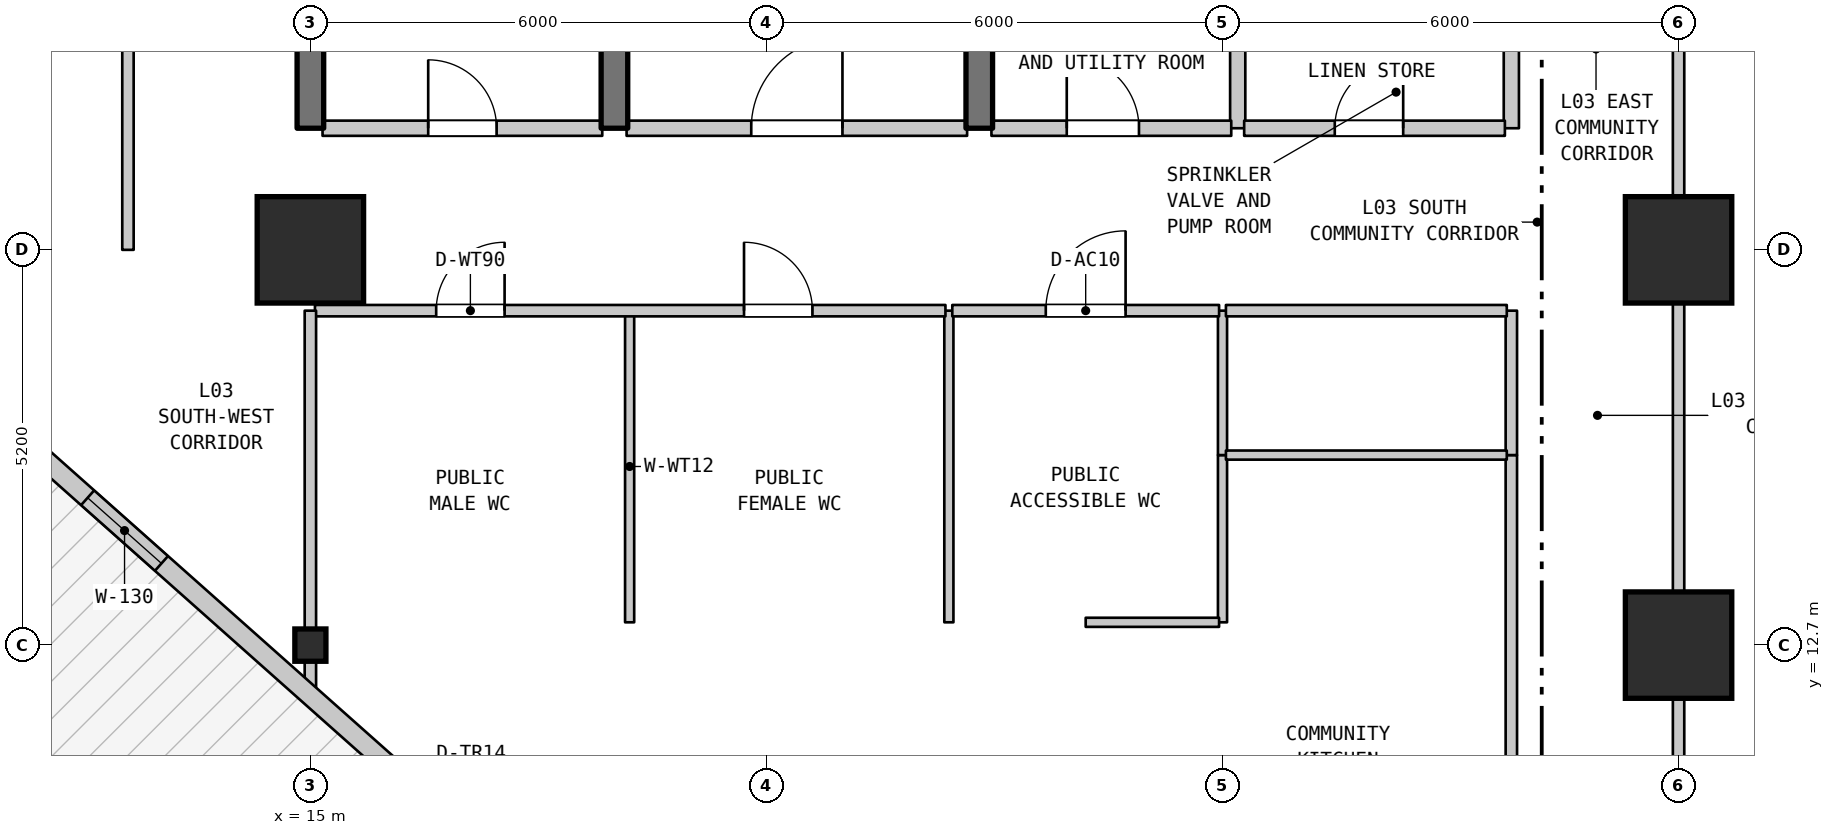
"""IFC4 building model, lengths in metres.
Left out: names, types, materials, properties, quantities, classifications, styles, units other than length and angle.
Written with IfcOpenShell. Run it as: python <this file> out.ifc"""

import sys

from ifc_helpers import new_model, si_unit, direction, frame, frame_2d, origin, origin_2d, place, context, subcontext, project, spatial, rectangle, i_section, extrude, element, fill, save


model = new_model("IFC4")
c1 = context("Model", 3, precision=1e-05, world=origin(), true_north=direction((0.0, 1.0)))
c2 = subcontext(c1, "Body", "Model", "MODEL_VIEW")
j1 = project(units=[si_unit("LENGTHUNIT", "METRE"), si_unit("PLANEANGLEUNIT", "RADIAN")], contexts=[c1])
p1 = place(None, origin())
s1 = spatial("IfcSite", under=j1, at=p1, CompositionType="ELEMENT")
p2 = place(p1, origin())
s2 = spatial("IfcBuilding", under=s1, at=p2, CompositionType="ELEMENT")
p3 = place(p2, frame((0.0, 0.0, 19.0)))
s3 = spatial("IfcBuildingStorey", under=s2, at=p3, CompositionType="ELEMENT", Elevation=19.0)
p4 = place(p3, frame((15.0, 12.7, 0.0), z_axis=(0.0, 0.0, 1.0), x_axis=(1.0, 0.0, 0.0)))
e1 = element("IfcColumn", 1, at=p4, inside=s3, PredefinedType="COLUMN", context=c2, shape_type="SweptSolid", body=[
    extrude(i_section(OverallWidth=0.409, OverallDepth=0.425, WebThickness=0.032, FlangeThickness=0.052, FilletRadius=0.015, at=origin_2d()), origin(), (0.0, 0.0, 1.0), 5.0),
])
for number, where, z_axis, x_axis in (
    (2, (15.0, 17.9, 0.0), (0.0, 0.0, 1.0), (1.0, 0.0, 0.0)),
    (3, (33.0, 12.7, 0.0), (0.0, 0.0, 1.0), (1.0, 0.0, 0.0)),
    (4, (33.0, 17.9, 0.0), (0.0, 0.0, 1.0), (1.0, 0.0, 0.0)),
):
    element("IfcColumn", number, at=place(p3, frame(where, z_axis=z_axis, x_axis=x_axis)), inside=s3, PredefinedType="COLUMN", context=c2, shape_type="SweptSolid", body=[
        extrude(rectangle(XDim=1.4, YDim=1.4, at=origin_2d()), origin(), (0.0, 0.0, 1.0), 5.0),
    ])
p5 = place(p3, frame((12.6, 17.9, 0.0), z_axis=(0.0, 0.0, 1.0), x_axis=(0.0, 1.0, 0.0)))
e5 = element("IfcWall", 5, at=p5, inside=s3, PredefinedType="STANDARD", context=c2, shape_type="SweptSolid", body=[
    extrude(rectangle(XDim=20.0, YDim=0.15, at=frame_2d((10.0, 0.0))), origin(), (0.0, 0.0, 1.0), 4.685),
])
p6 = place(p5, frame((8.93, 0.0, 0.0)))
e6 = element("IfcOpeningElement", 6, at=p6, cuts=e5, PredefinedType="OPENING", context=c2, shape_type="SweptSolid", body=[
    extrude(rectangle(XDim=1.2, YDim=2.2, at=frame_2d((0.6, 1.1))), frame((0.0, 0.085, 0.0), z_axis=(0.0, -1.0, 0.0), x_axis=(1.0, 0.0, 0.0)), (0.0, 0.0, 1.0), 0.17),
])
p7 = place(p3, frame((15.0, 12.043, 0.0), z_axis=(0.0, 0.0, 1.0), x_axis=(0.0, 1.0, 0.0)))
e7 = element("IfcWall", 7, at=p7, inside=s3, PredefinedType="STANDARD", context=c2, shape_type="SweptSolid", body=[
    extrude(rectangle(XDim=0.657, YDim=0.15, at=frame_2d((0.329, 0.0))), origin(), (0.0, 0.0, 1.0), 4.685),
])
for number, where, z_axis, x_axis in (
    (8, (15.0, 19.5, 0.0), (0.0, 0.0, 1.0), (0.0, 1.0, 0.0)),
    (9, (19.0, 19.5, 0.0), (0.0, 0.0, 1.0), (0.0, 1.0, 0.0)),
):
    element("IfcWall", number, at=place(p3, frame(where, z_axis=z_axis, x_axis=x_axis)), inside=s3, PredefinedType="SHEAR", context=c2, shape_type="SweptSolid", body=[
        extrude(rectangle(XDim=3.2, YDim=0.35, at=frame_2d((1.6, 0.0))), origin(), (0.0, 0.0, 1.0), 4.685),
    ])
for number, where, z_axis, x_axis in (
    (10, (19.2, 13.0, 0.0), (0.0, 0.0, 1.0), (0.0, 1.0, 0.0)),
    (11, (23.4, 13.0, 0.0), (0.0, 0.0, 1.0), (0.0, 1.0, 0.0)),
):
    element("IfcWall", number, at=place(p3, frame(where, z_axis=z_axis, x_axis=x_axis)), inside=s3, PredefinedType="PARTITIONING", context=c2, shape_type="SweptSolid", body=[
        extrude(rectangle(XDim=4.1, YDim=0.12, at=frame_2d((2.05, 0.0))), origin(), (0.0, 0.0, 1.0), 4.685),
    ])
p8 = place(p3, frame((23.8, 19.5, 0.0), z_axis=(0.0, 0.0, 1.0), x_axis=(0.0, 1.0, 0.0)))
e12 = element("IfcWall", 12, at=p8, inside=s3, PredefinedType="SHEAR", context=c2, shape_type="SweptSolid", body=[
    extrude(rectangle(XDim=3.2, YDim=0.35, at=frame_2d((1.6, 0.0))), origin(), (0.0, 0.0, 1.0), 4.685),
])
p9 = place(p3, frame((27.0, 13.0, 0.0), z_axis=(0.0, 0.0, 1.0), x_axis=(0.0, 1.0, 0.0)))
e13 = element("IfcWall", 13, at=p9, inside=s3, PredefinedType="PARTITIONING", context=c2, shape_type="SweptSolid", body=[
    extrude(rectangle(XDim=2.2, YDim=0.12, at=frame_2d((1.1, 0.0))), origin(), (0.0, 0.0, 1.0), 4.685),
])
p10 = place(p3, frame((27.0, 15.2, 0.0), z_axis=(0.0, 0.0, 1.0), x_axis=(0.0, 1.0, 0.0)))
e14 = element("IfcWall", 14, at=p10, inside=s3, PredefinedType="PARTITIONING", context=c2, shape_type="SweptSolid", body=[
    extrude(rectangle(XDim=1.9, YDim=0.12, at=frame_2d((0.95, 0.0))), origin(), (0.0, 0.0, 1.0), 4.685),
])
p11 = place(p3, frame((27.2, 19.5, 0.0), z_axis=(0.0, 0.0, 1.0), x_axis=(0.0, 1.0, 0.0)))
e15 = element("IfcWall", 15, at=p11, inside=s3, PredefinedType="STANDARD", context=c2, shape_type="SweptSolid", body=[
    extrude(rectangle(XDim=1.6, YDim=0.2, at=frame_2d((0.8, 0.0))), origin(), (0.0, 0.0, 1.0), 4.685),
])
p12 = place(p3, frame((30.8, 8.5, 0.0), z_axis=(0.0, 0.0, 1.0), x_axis=(0.0, 1.0, 0.0)))
e16 = element("IfcWall", 16, at=p12, inside=s3, PredefinedType="STANDARD", context=c2, shape_type="SweptSolid", body=[
    extrude(rectangle(XDim=6.7, YDim=0.15, at=frame_2d((3.35, 0.0))), origin(), (0.0, 0.0, 1.0), 4.685),
])
p13 = place(p3, frame((30.8, 15.2, 0.0), z_axis=(0.0, 0.0, 1.0), x_axis=(0.0, 1.0, 0.0)))
e17 = element("IfcWall", 17, at=p13, inside=s3, PredefinedType="STANDARD", context=c2, shape_type="SweptSolid", body=[
    extrude(rectangle(XDim=1.9, YDim=0.15, at=frame_2d((0.95, 0.0))), origin(), (0.0, 0.0, 1.0), 4.685),
])
p14 = place(p3, frame((30.8, 19.5, 0.0), z_axis=(0.0, 0.0, 1.0), x_axis=(0.0, 1.0, 0.0)))
e18 = element("IfcWall", 18, at=p14, inside=s3, PredefinedType="STANDARD", context=c2, shape_type="SweptSolid", body=[
    extrude(rectangle(XDim=1.6, YDim=0.2, at=frame_2d((0.8, 0.0))), origin(), (0.0, 0.0, 1.0), 4.685),
])
p15 = place(p3, frame((33.0, 6.7, 0.0), z_axis=(0.0, 0.0, 1.0), x_axis=(0.0, 1.0, 0.0)))
e19 = element("IfcWall", 19, at=p15, inside=s3, PredefinedType="STANDARD", context=c2, shape_type="SweptSolid", body=[
    extrude(rectangle(XDim=19.2, YDim=0.15, at=frame_2d((9.6, 0.0))), origin(), (0.0, 0.0, 1.0), 4.185),
])
p16 = place(p3, frame((25.2, 13.0, 0.0), z_axis=(0.0, 0.0, 1.0), x_axis=(1.0, 0.0, 0.0)))
e20 = element("IfcWall", 20, at=p16, inside=s3, PredefinedType="PARTITIONING", context=c2, shape_type="SweptSolid", body=[
    extrude(rectangle(XDim=1.755, YDim=0.12, at=frame_2d((0.877, 0.0))), origin(), (0.0, 0.0, 1.0), 4.685),
])
p17 = place(p3, frame((27.045, 15.2, 0.0), z_axis=(0.0, 0.0, 1.0), x_axis=(1.0, 0.0, 0.0)))
e21 = element("IfcWall", 21, at=p17, inside=s3, PredefinedType="PARTITIONING", context=c2, shape_type="SweptSolid", body=[
    extrude(rectangle(XDim=3.695, YDim=0.12, at=frame_2d((1.848, 0.0))), origin(), (0.0, 0.0, 1.0), 4.685),
])
p18 = place(p3, frame((15.06, 17.1, 0.0), z_axis=(0.0, 0.0, 1.0), x_axis=(1.0, 0.0, 0.0)))
e22 = element("IfcWall", 22, at=p18, inside=s3, PredefinedType="STANDARD", context=c2, shape_type="SweptSolid", body=[
    extrude(rectangle(XDim=8.295, YDim=0.15, at=frame_2d((4.147, 0.0))), origin(), (0.0, 0.0, 1.0), 4.685),
])
p19 = place(p18, frame((1.595, 0.0, 0.0)))
e23 = element("IfcOpeningElement", 23, at=p19, cuts=e22, PredefinedType="OPENING", context=c2, shape_type="SweptSolid", body=[
    extrude(rectangle(XDim=0.9, YDim=2.1, at=frame_2d((0.45, 1.05))), frame((0.0, 0.085, 0.0), z_axis=(0.0, -1.0, 0.0), x_axis=(1.0, 0.0, 0.0)), (0.0, 0.0, 1.0), 0.17),
])
p20 = place(p18, frame((5.645, 0.0, 0.0)))
e24 = element("IfcOpeningElement", 24, at=p20, cuts=e22, PredefinedType="OPENING", context=c2, shape_type="SweptSolid", body=[
    extrude(rectangle(XDim=0.9, YDim=2.1, at=frame_2d((0.45, 1.05))), frame((0.0, 0.085, 0.0), z_axis=(0.0, -1.0, 0.0), x_axis=(1.0, 0.0, 0.0)), (0.0, 0.0, 1.0), 0.17),
])
p21 = place(p3, frame((23.445, 17.1, 0.0), z_axis=(0.0, 0.0, 1.0), x_axis=(1.0, 0.0, 0.0)))
e25 = element("IfcWall", 25, at=p21, inside=s3, PredefinedType="STANDARD", context=c2, shape_type="SweptSolid", body=[
    extrude(rectangle(XDim=3.51, YDim=0.15, at=frame_2d((1.755, 0.0))), origin(), (0.0, 0.0, 1.0), 4.685),
])
p22 = place(p21, frame((1.23, 0.0, 0.0)))
e26 = element("IfcOpeningElement", 26, at=p22, cuts=e25, PredefinedType="OPENING", context=c2, shape_type="SweptSolid", body=[
    extrude(rectangle(XDim=1.05, YDim=2.15, at=frame_2d((0.525, 1.075))), frame((0.0, 0.085, 0.0), z_axis=(0.0, -1.0, 0.0), x_axis=(1.0, 0.0, 0.0)), (0.0, 0.0, 1.0), 0.17),
])
p23 = place(p3, frame((27.045, 17.1, 0.0), z_axis=(0.0, 0.0, 1.0), x_axis=(1.0, 0.0, 0.0)))
e27 = element("IfcWall", 27, at=p23, inside=s3, PredefinedType="STANDARD", context=c2, shape_type="SweptSolid", body=[
    extrude(rectangle(XDim=3.695, YDim=0.15, at=frame_2d((1.848, 0.0))), origin(), (0.0, 0.0, 1.0), 4.685),
])
p24 = place(p3, frame((15.16, 19.5, 0.0), z_axis=(0.0, 0.0, 1.0), x_axis=(1.0, 0.0, 0.0)))
e28 = element("IfcWall", 28, at=p24, inside=s3, PredefinedType="STANDARD", context=c2, shape_type="SweptSolid", body=[
    extrude(rectangle(XDim=3.68, YDim=0.2, at=frame_2d((1.84, 0.0))), origin(), (0.0, 0.0, 1.0), 4.685),
])
p25 = place(p24, frame((1.39, 0.0, 0.0)))
e29 = element("IfcOpeningElement", 29, at=p25, cuts=e28, PredefinedType="OPENING", context=c2, shape_type="SweptSolid", body=[
    extrude(rectangle(XDim=0.9, YDim=2.15, at=frame_2d((0.45, 1.075))), frame((0.0, 0.11, 0.0), z_axis=(0.0, -1.0, 0.0), x_axis=(1.0, 0.0, 0.0)), (0.0, 0.0, 1.0), 0.22),
])
p26 = place(p3, frame((19.16, 19.5, 0.0), z_axis=(0.0, 0.0, 1.0), x_axis=(1.0, 0.0, 0.0)))
e30 = element("IfcWall", 30, at=p26, inside=s3, PredefinedType="STANDARD", context=c2, shape_type="SweptSolid", body=[
    extrude(rectangle(XDim=4.48, YDim=0.2, at=frame_2d((2.24, 0.0))), origin(), (0.0, 0.0, 1.0), 4.685),
])
p27 = place(p26, frame((1.64, 0.0, 0.0)))
e31 = element("IfcOpeningElement", 31, at=p27, cuts=e30, PredefinedType="OPENING", context=c2, shape_type="SweptSolid", body=[
    extrude(rectangle(XDim=1.2, YDim=2.2, at=frame_2d((0.6, 1.1))), frame((0.0, 0.11, 0.0), z_axis=(0.0, -1.0, 0.0), x_axis=(1.0, 0.0, 0.0)), (0.0, 0.0, 1.0), 0.22),
])
p28 = place(p3, frame((23.96, 19.5, 0.0), z_axis=(0.0, 0.0, 1.0), x_axis=(1.0, 0.0, 0.0)))
e32 = element("IfcWall", 32, at=p28, inside=s3, PredefinedType="STANDARD", context=c2, shape_type="SweptSolid", body=[
    extrude(rectangle(XDim=3.155, YDim=0.2, at=frame_2d((1.578, 0.0))), origin(), (0.0, 0.0, 1.0), 4.685),
])
p29 = place(p28, frame((0.991, 0.0, 0.0)))
e33 = element("IfcOpeningElement", 33, at=p29, cuts=e32, PredefinedType="OPENING", context=c2, shape_type="SweptSolid", body=[
    extrude(rectangle(XDim=0.95, YDim=2.15, at=frame_2d((0.475, 1.075))), frame((0.0, 0.11, 0.0), z_axis=(0.0, -1.0, 0.0), x_axis=(1.0, 0.0, 0.0)), (0.0, 0.0, 1.0), 0.22),
])
p30 = place(p3, frame((27.285, 19.5, 0.0), z_axis=(0.0, 0.0, 1.0), x_axis=(1.0, 0.0, 0.0)))
e34 = element("IfcWall", 34, at=p30, inside=s3, PredefinedType="STANDARD", context=c2, shape_type="SweptSolid", body=[
    extrude(rectangle(XDim=3.43, YDim=0.2, at=frame_2d((1.715, 0.0))), origin(), (0.0, 0.0, 1.0), 4.685),
])
p31 = place(p30, frame((1.192, 0.0, 0.0)))
e35 = element("IfcOpeningElement", 35, at=p31, cuts=e34, PredefinedType="OPENING", context=c2, shape_type="SweptSolid", body=[
    extrude(rectangle(XDim=0.9, YDim=2.15, at=frame_2d((0.45, 1.075))), frame((0.0, 0.11, 0.0), z_axis=(0.0, -1.0, 0.0), x_axis=(1.0, 0.0, 0.0)), (0.0, 0.0, 1.0), 0.22),
])
p32 = place(p3, frame((17.64, 9.686, 0.0), z_axis=(0.0, 0.0, 1.0), x_axis=(-0.747409318684, 0.66436383883, 0.0)))
e36 = element("IfcWall", 36, at=p32, inside=s3, PredefinedType="STANDARD", context=c2, shape_type="SweptSolid", body=[
    extrude(rectangle(XDim=18.204, YDim=0.26, at=frame_2d((9.102, 0.0))), origin(), (0.0, 0.0, 1.0), 4.685),
])
p33 = place(p32, origin())
e37 = element("IfcOpeningElement", 37, at=p33, cuts=e36, PredefinedType="OPENING", context=c2, shape_type="SweptSolid", body=[
    extrude(rectangle(XDim=1.4, YDim=2.2, at=frame_2d((0.7, 1.1))), frame((0.0, 0.14, 0.0), z_axis=(0.0, -1.0, 0.0), x_axis=(1.0, 0.0, 0.0)), (0.0, 0.0, 1.0), 0.28),
])
p34 = place(p32, frame((6.154, 0.0, 0.9)))
e38 = element("IfcOpeningElement", 38, at=p34, cuts=e36, PredefinedType="OPENING", context=c2, shape_type="SweptSolid", body=[
    extrude(rectangle(XDim=1.3, YDim=1.9, at=frame_2d((0.65, 0.95))), frame((0.0, 0.14, 0.0), z_axis=(0.0, -1.0, 0.0), x_axis=(1.0, 0.0, 0.0)), (0.0, 0.0, 1.0), 0.28),
])
p35 = place(p32, frame((8.587, 0.0, 0.9)))
e39 = element("IfcOpeningElement", 39, at=p35, cuts=e36, PredefinedType="OPENING", context=c2, shape_type="SweptSolid", body=[
    extrude(rectangle(XDim=1.4, YDim=1.85, at=frame_2d((0.7, 0.925))), frame((0.0, 0.14, 0.0), z_axis=(0.0, -1.0, 0.0), x_axis=(1.0, 0.0, 0.0)), (0.0, 0.0, 1.0), 0.28),
])
p36 = place(p32, frame((13.454, 0.0, 0.9)))
e40 = element("IfcOpeningElement", 40, at=p36, cuts=e36, PredefinedType="OPENING", context=c2, shape_type="SweptSolid", body=[
    extrude(rectangle(XDim=1.3, YDim=1.9, at=frame_2d((0.65, 0.95))), frame((0.0, 0.14, 0.0), z_axis=(0.0, -1.0, 0.0), x_axis=(1.0, 0.0, 0.0)), (0.0, 0.0, 1.0), 0.28),
])
p37 = place(p32, frame((15.887, 0.0, 0.9)))
e41 = element("IfcOpeningElement", 41, at=p37, cuts=e36, PredefinedType="OPENING", context=c2, shape_type="SweptSolid", body=[
    extrude(rectangle(XDim=1.4, YDim=1.85, at=frame_2d((0.7, 0.925))), frame((0.0, 0.14, 0.0), z_axis=(0.0, -1.0, 0.0), x_axis=(1.0, 0.0, 0.0)), (0.0, 0.0, 1.0), 0.28),
])
p38 = place(p3, frame((15.0, 12.7, 0.0), z_axis=(0.0, 0.0, 1.0), x_axis=(0.0, 1.0, 0.0)))
e42 = element("IfcWall", 42, at=p38, inside=s3, PredefinedType="STANDARD", context=c2, shape_type="SweptSolid", body=[
    extrude(rectangle(XDim=4.4, YDim=0.15, at=frame_2d((2.2, 0.0))), origin(), (0.0, 0.0, 1.0), 4.185),
])
p39 = place(p34, origin())
e43 = element("IfcWindow", 43, at=p39, inside=s3, PartitioningType="SINGLE_PANEL", PredefinedType="WINDOW", context=c2, shape_type="SweptSolid", body=[
    extrude(rectangle(XDim=1.3, YDim=1.9, at=frame_2d((0.65, 0.95))), frame((0.0, 0.03, 0.0), z_axis=(0.0, -1.0, 0.0), x_axis=(1.0, 0.0, 0.0)), (0.0, 0.0, 1.0), 0.06),
])
fill(e38, e43)
p40 = place(p19, origin())
e44 = element("IfcDoor", 44, at=p40, inside=s3, OperationType="SINGLE_SWING_RIGHT", PredefinedType="DOOR", context=c2, shape_type="SweptSolid", body=[
    extrude(rectangle(XDim=0.9, YDim=2.1, at=frame_2d((0.45, 1.05))), frame((0.0, 0.025, 0.0), z_axis=(0.0, -1.0, 0.0), x_axis=(1.0, 0.0, 0.0)), (0.0, 0.0, 1.0), 0.05),
])
fill(e23, e44)
p41 = place(p20, origin())
e45 = element("IfcDoor", 45, at=p41, inside=s3, OperationType="SINGLE_SWING_LEFT", PredefinedType="DOOR", context=c2, shape_type="SweptSolid", body=[
    extrude(rectangle(XDim=0.9, YDim=2.1, at=frame_2d((0.45, 1.05))), frame((0.0, 0.025, 0.0), z_axis=(0.0, -1.0, 0.0), x_axis=(1.0, 0.0, 0.0)), (0.0, 0.0, 1.0), 0.05),
])
fill(e24, e45)
p42 = place(p22, origin())
e46 = element("IfcDoor", 46, at=p42, inside=s3, OperationType="SINGLE_SWING_RIGHT", PredefinedType="DOOR", context=c2, shape_type="SweptSolid", body=[
    extrude(rectangle(XDim=1.05, YDim=2.15, at=frame_2d((0.525, 1.075))), frame((0.0, 0.025, 0.0), z_axis=(0.0, -1.0, 0.0), x_axis=(1.0, 0.0, 0.0)), (0.0, 0.0, 1.0), 0.05),
])
fill(e26, e46)
p43 = place(p25, origin())
e47 = element("IfcDoor", 47, at=p43, inside=s3, OperationType="SINGLE_SWING_LEFT", PredefinedType="DOOR", context=c2, shape_type="SweptSolid", body=[
    extrude(rectangle(XDim=0.9, YDim=2.15, at=frame_2d((0.45, 1.075))), frame((0.0, 0.025, 0.0), z_axis=(0.0, -1.0, 0.0), x_axis=(1.0, 0.0, 0.0)), (0.0, 0.0, 1.0), 0.05),
])
fill(e29, e47)
p44 = place(p27, origin())
e48 = element("IfcDoor", 48, at=p44, inside=s3, OperationType="SINGLE_SWING_RIGHT", PredefinedType="DOOR", context=c2, shape_type="SweptSolid", body=[
    extrude(rectangle(XDim=1.2, YDim=2.2, at=frame_2d((0.6, 1.1))), frame((0.0, 0.025, 0.0), z_axis=(0.0, -1.0, 0.0), x_axis=(1.0, 0.0, 0.0)), (0.0, 0.0, 1.0), 0.05),
])
fill(e31, e48)
p45 = place(p29, origin())
e49 = element("IfcDoor", 49, at=p45, inside=s3, OperationType="SINGLE_SWING_LEFT", PredefinedType="DOOR", context=c2, shape_type="SweptSolid", body=[
    extrude(rectangle(XDim=0.95, YDim=2.15, at=frame_2d((0.475, 1.075))), frame((0.0, 0.025, 0.0), z_axis=(0.0, -1.0, 0.0), x_axis=(1.0, 0.0, 0.0)), (0.0, 0.0, 1.0), 0.05),
])
fill(e33, e49)
p46 = place(p31, origin())
e50 = element("IfcDoor", 50, at=p46, inside=s3, OperationType="SINGLE_SWING_RIGHT", PredefinedType="DOOR", context=c2, shape_type="SweptSolid", body=[
    extrude(rectangle(XDim=0.9, YDim=2.15, at=frame_2d((0.45, 1.075))), frame((0.0, 0.025, 0.0), z_axis=(0.0, -1.0, 0.0), x_axis=(1.0, 0.0, 0.0)), (0.0, 0.0, 1.0), 0.05),
])
fill(e35, e50)
save(model, sys.argv[1])
